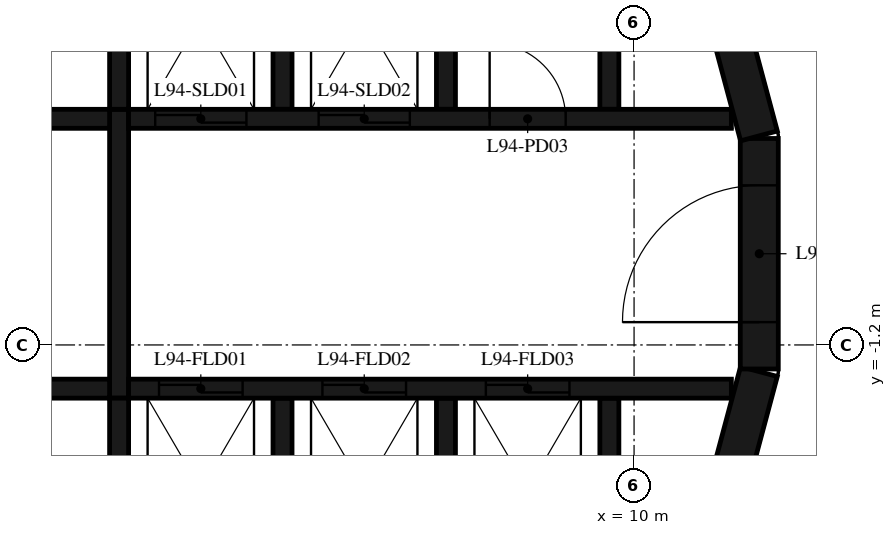
"""IFC4 building model, lengths in metres.
Left out: names, types, materials, properties, quantities, classifications, styles, units other than length and angle.
Written with IfcOpenShell. Run it as: python <this file> out.ifc"""

import sys

from ifc_helpers import new_model, si_unit, direction, frame, frame_2d, origin, place, context, subcontext, project, spatial, polyline, rectangle, outline, extrude, element, fill, save


model = new_model("IFC4")
c1 = context("Model", 3, precision=1e-05, world=origin(), true_north=direction((0.0, 1.0)))
c2 = subcontext(c1, "Body", "Model", "MODEL_VIEW")
j1 = project(units=[si_unit("LENGTHUNIT", "METRE"), si_unit("PLANEANGLEUNIT", "RADIAN")], contexts=[c1])
p1 = place(None, origin())
s1 = spatial("IfcSite", under=j1, at=p1, CompositionType="ELEMENT")
p2 = place(p1, origin())
s2 = spatial("IfcBuilding", under=s1, at=p2, CompositionType="ELEMENT")
p3 = place(p2, frame((0.0, 0.0, 366.2)))
s3 = spatial("IfcBuildingStorey", under=s2, at=p3, CompositionType="ELEMENT", Elevation=366.2)
p4 = place(p3, frame((10.858, -4.479, 0.0), z_axis=(0.0, 0.0, 1.0), x_axis=(0.258734743916, 0.965948410781, 0.0)))
e1 = element("IfcWall", 1, at=p4, inside=s3, PredefinedType="SHEAR", context=c2, shape_type="SweptSolid", body=[
    extrude(rectangle(XDim=3.033, YDim=0.5, at=frame_2d((1.516, 0.0))), origin(), (0.0, 0.0, 1.0), 4.8),
])
p5 = place(p3, frame((11.647, -1.516, 0.0), z_axis=(0.0, 0.0, 1.0), x_axis=(0.0, 1.0, 0.0)))
e2 = element("IfcWall", 2, at=p5, inside=s3, PredefinedType="SHEAR", context=c2, shape_type="SweptSolid", body=[
    extrude(rectangle(XDim=3.033, YDim=0.5, at=frame_2d((1.516, 0.0))), origin(), (0.0, 0.0, 1.0), 4.8),
])
p6 = place(p5, frame((0.616, 0.0, 0.0)))
e3 = element("IfcOpeningElement", 3, at=p6, cuts=e2, PredefinedType="OPENING", context=c2, shape_type="SweptSolid", body=[
    extrude(rectangle(XDim=1.8, YDim=2.1, at=frame_2d((0.9, 1.05))), frame((0.0, 0.26, 0.0), z_axis=(0.0, -1.0, 0.0), x_axis=(1.0, 0.0, 0.0)), (0.0, 0.0, 1.0), 0.52),
])
p7 = place(p3, frame((11.643, 1.55, 0.0), z_axis=(0.0, 0.0, 1.0), x_axis=(-0.258734743916, 0.965948410781, 0.0)))
e4 = element("IfcWall", 4, at=p7, inside=s3, PredefinedType="SHEAR", context=c2, shape_type="SweptSolid", body=[
    extrude(rectangle(XDim=3.033, YDim=0.5, at=frame_2d((1.516, 0.0))), origin(), (0.0, 0.0, 1.0), 4.8),
])
p8 = place(p3, origin())
e5 = element("IfcWall", 5, at=p8, inside=s3, PredefinedType="SHEAR", context=c2, shape_type="SweptSolid", body=[
    extrude(outline(polyline([(-9.8, 1.9), (-9.55, 1.9), (-9.55, 4.8), (-5.5, 4.8), (-5.5, 1.9), (-5.25, 1.9), (-5.25, 4.8), (3.1, 4.8), (3.1, 1.9), (3.35, 1.9), (3.35, 4.8), (5.25, 4.8), (5.25, 1.9), (5.5, 1.9), (5.5, 4.8), (7.4, 4.8), (7.4, 1.9), (7.65, 1.9), (7.65, 4.8), (9.55, 4.8), (9.55, 1.9), (9.8, 1.9), (9.8, 4.8), (9.8, 5.05), (-9.8, 5.05), (-9.8, 4.8), (-9.8, 1.9)])), origin(), (0.0, 0.0, 1.0), 4.8),
])
p9 = place(p3, origin())
e6 = element("IfcWall", 6, at=p9, inside=s3, PredefinedType="SHEAR", context=c2, shape_type="SweptSolid", body=[
    extrude(outline(polyline([(9.8, -4.8), (9.8, -1.9), (9.55, -1.9), (9.55, -4.8), (7.65, -4.8), (7.65, -1.9), (7.4, -1.9), (7.4, -4.8), (5.5, -4.8), (5.5, -1.9), (5.25, -1.9), (5.25, -4.8), (3.35, -4.8), (3.35, -1.9), (3.1, -1.9), (3.1, -4.8), (-9.55, -4.8), (-9.55, -1.9), (-9.8, -1.9), (-9.8, -4.8), (-9.8, -5.05), (9.8, -5.05), (9.8, -4.8)])), origin(), (0.0, 0.0, 1.0), 4.8),
])
p10 = place(p3, frame((-11.28, 1.775, 0.0), z_axis=(0.0, 0.0, 1.0), x_axis=(1.0, 0.0, 0.0)))
e7 = element("IfcWall", 7, at=p10, inside=s3, PredefinedType="SHEAR", context=c2, shape_type="SweptSolid", body=[
    extrude(rectangle(XDim=14.38, YDim=0.25, at=frame_2d((7.19, 0.0))), origin(), (0.0, 0.0, 1.0), 4.8),
])
p11 = place(p10, frame((3.255, 0.0, 0.0)))
e8 = element("IfcOpeningElement", 8, at=p11, cuts=e7, PredefinedType="OPENING", context=c2, shape_type="SweptSolid", body=[
    extrude(rectangle(XDim=1.0, YDim=2.4, at=frame_2d((0.5, 1.2))), frame((0.0, 0.135, 0.0), z_axis=(0.0, -1.0, 0.0), x_axis=(1.0, 0.0, 0.0)), (0.0, 0.0, 1.0), 0.27),
])
p12 = place(p10, frame((9.705, 0.0, 0.0)))
e9 = element("IfcOpeningElement", 9, at=p12, cuts=e7, PredefinedType="OPENING", context=c2, shape_type="SweptSolid", body=[
    extrude(rectangle(XDim=1.0, YDim=2.4, at=frame_2d((0.5, 1.2))), frame((0.0, 0.135, 0.0), z_axis=(0.0, -1.0, 0.0), x_axis=(1.0, 0.0, 0.0)), (0.0, 0.0, 1.0), 0.27),
])
p13 = place(p3, frame((3.35, 1.775, 0.0), z_axis=(0.0, 0.0, 1.0), x_axis=(1.0, 0.0, 0.0)))
e10 = element("IfcWall", 10, at=p13, inside=s3, PredefinedType="SHEAR", context=c2, shape_type="SweptSolid", body=[
    extrude(rectangle(XDim=7.93, YDim=0.25, at=frame_2d((3.965, 0.0))), origin(), (0.0, 0.0, 1.0), 4.8),
])
p14 = place(p13, frame((0.35, 0.0, 0.0)))
e11 = element("IfcOpeningElement", 11, at=p14, cuts=e10, PredefinedType="OPENING", context=c2, shape_type="SweptSolid", body=[
    extrude(rectangle(XDim=1.2, YDim=2.4, at=frame_2d((0.6, 1.2))), frame((0.0, 0.135, 0.0), z_axis=(0.0, -1.0, 0.0), x_axis=(1.0, 0.0, 0.0)), (0.0, 0.0, 1.0), 0.27),
])
p15 = place(p13, frame((2.5, 0.0, 0.0)))
e12 = element("IfcOpeningElement", 12, at=p15, cuts=e10, PredefinedType="OPENING", context=c2, shape_type="SweptSolid", body=[
    extrude(rectangle(XDim=1.2, YDim=2.4, at=frame_2d((0.6, 1.2))), frame((0.0, 0.135, 0.0), z_axis=(0.0, -1.0, 0.0), x_axis=(1.0, 0.0, 0.0)), (0.0, 0.0, 1.0), 0.27),
])
p16 = place(p13, frame((4.75, 0.0, 0.0)))
e13 = element("IfcOpeningElement", 13, at=p16, cuts=e10, PredefinedType="OPENING", context=c2, shape_type="SweptSolid", body=[
    extrude(rectangle(XDim=1.0, YDim=2.4, at=frame_2d((0.5, 1.2))), frame((0.0, 0.135, 0.0), z_axis=(0.0, -1.0, 0.0), x_axis=(1.0, 0.0, 0.0)), (0.0, 0.0, 1.0), 0.27),
])
p17 = place(p3, frame((-11.28, -1.775, 0.0), z_axis=(0.0, 0.0, 1.0), x_axis=(1.0, 0.0, 0.0)))
e14 = element("IfcWall", 14, at=p17, inside=s3, PredefinedType="SHEAR", context=c2, shape_type="SweptSolid", body=[
    extrude(rectangle(XDim=14.38, YDim=0.25, at=frame_2d((7.19, 0.0))), origin(), (0.0, 0.0, 1.0), 4.8),
])
p18 = place(p17, frame((7.555, 0.0, 0.0)))
e15 = element("IfcOpeningElement", 15, at=p18, cuts=e14, PredefinedType="OPENING", context=c2, shape_type="SweptSolid", body=[
    extrude(rectangle(XDim=1.0, YDim=2.4, at=frame_2d((0.5, 1.2))), frame((0.0, 0.135, 0.0), z_axis=(0.0, -1.0, 0.0), x_axis=(1.0, 0.0, 0.0)), (0.0, 0.0, 1.0), 0.27),
])
p19 = place(p3, frame((3.35, -1.775, 0.0), z_axis=(0.0, 0.0, 1.0), x_axis=(1.0, 0.0, 0.0)))
e16 = element("IfcWall", 16, at=p19, inside=s3, PredefinedType="SHEAR", context=c2, shape_type="SweptSolid", body=[
    extrude(rectangle(XDim=7.93, YDim=0.25, at=frame_2d((3.965, 0.0))), origin(), (0.0, 0.0, 1.0), 4.8),
])
p20 = place(p19, frame((0.4, 0.0, 0.0)))
e17 = element("IfcOpeningElement", 17, at=p20, cuts=e16, PredefinedType="OPENING", context=c2, shape_type="SweptSolid", body=[
    extrude(rectangle(XDim=1.1, YDim=2.4, at=frame_2d((0.55, 1.2))), frame((0.0, 0.135, 0.0), z_axis=(0.0, -1.0, 0.0), x_axis=(1.0, 0.0, 0.0)), (0.0, 0.0, 1.0), 0.27),
])
p21 = place(p19, frame((2.55, 0.0, 0.0)))
e18 = element("IfcOpeningElement", 18, at=p21, cuts=e16, PredefinedType="OPENING", context=c2, shape_type="SweptSolid", body=[
    extrude(rectangle(XDim=1.1, YDim=2.4, at=frame_2d((0.55, 1.2))), frame((0.0, 0.135, 0.0), z_axis=(0.0, -1.0, 0.0), x_axis=(1.0, 0.0, 0.0)), (0.0, 0.0, 1.0), 0.27),
])
p22 = place(p19, frame((4.7, 0.0, 0.0)))
e19 = element("IfcOpeningElement", 19, at=p22, cuts=e16, PredefinedType="OPENING", context=c2, shape_type="SweptSolid", body=[
    extrude(rectangle(XDim=1.1, YDim=2.4, at=frame_2d((0.55, 1.2))), frame((0.0, 0.135, 0.0), z_axis=(0.0, -1.0, 0.0), x_axis=(1.0, 0.0, 0.0)), (0.0, 0.0, 1.0), 0.27),
])
p23 = place(p3, frame((3.225, -1.9, 0.0), z_axis=(0.0, 0.0, 1.0), x_axis=(0.0, 1.0, 0.0)))
e20 = element("IfcWall", 20, at=p23, inside=s3, PredefinedType="SHEAR", context=c2, shape_type="SweptSolid", body=[
    extrude(rectangle(XDim=3.8, YDim=0.25, at=frame_2d((1.9, 0.0))), origin(), (0.0, 0.0, 1.0), 4.8),
])
p24 = place(p6, origin())
e21 = element("IfcDoor", 21, at=p24, inside=s3, OperationType="DOUBLE_DOOR_SINGLE_SWING", PredefinedType="DOOR", context=c2, shape_type="SweptSolid", body=[
    extrude(rectangle(XDim=1.8, YDim=2.1, at=frame_2d((0.9, 1.05))), frame((0.0, 0.025, 0.0), z_axis=(0.0, -1.0, 0.0), x_axis=(1.0, 0.0, 0.0)), (0.0, 0.0, 1.0), 0.05),
])
fill(e3, e21)
p25 = place(p14, origin())
e22 = element("IfcDoor", 22, at=p25, inside=s3, OperationType="DOUBLE_DOOR_SLIDING", PredefinedType="DOOR", context=c2, shape_type="SweptSolid", body=[
    extrude(rectangle(XDim=1.2, YDim=2.4, at=frame_2d((0.6, 1.2))), frame((0.0, 0.025, 0.0), z_axis=(0.0, -1.0, 0.0), x_axis=(1.0, 0.0, 0.0)), (0.0, 0.0, 1.0), 0.05),
])
fill(e11, e22)
p26 = place(p15, origin())
e23 = element("IfcDoor", 23, at=p26, inside=s3, OperationType="DOUBLE_DOOR_SLIDING", PredefinedType="DOOR", context=c2, shape_type="SweptSolid", body=[
    extrude(rectangle(XDim=1.2, YDim=2.4, at=frame_2d((0.6, 1.2))), frame((0.0, 0.025, 0.0), z_axis=(0.0, -1.0, 0.0), x_axis=(1.0, 0.0, 0.0)), (0.0, 0.0, 1.0), 0.05),
])
fill(e12, e23)
p27 = place(p20, origin())
e24 = element("IfcDoor", 24, at=p27, inside=s3, OperationType="DOUBLE_DOOR_SLIDING", PredefinedType="DOOR", context=c2, shape_type="SweptSolid", body=[
    extrude(rectangle(XDim=1.1, YDim=2.4, at=frame_2d((0.55, 1.2))), frame((0.0, 0.025, 0.0), z_axis=(0.0, -1.0, 0.0), x_axis=(1.0, 0.0, 0.0)), (0.0, 0.0, 1.0), 0.05),
])
fill(e17, e24)
p28 = place(p21, origin())
e25 = element("IfcDoor", 25, at=p28, inside=s3, OperationType="DOUBLE_DOOR_SLIDING", PredefinedType="DOOR", context=c2, shape_type="SweptSolid", body=[
    extrude(rectangle(XDim=1.1, YDim=2.4, at=frame_2d((0.55, 1.2))), frame((0.0, 0.025, 0.0), z_axis=(0.0, -1.0, 0.0), x_axis=(1.0, 0.0, 0.0)), (0.0, 0.0, 1.0), 0.05),
])
fill(e18, e25)
p29 = place(p22, origin())
e26 = element("IfcDoor", 26, at=p29, inside=s3, OperationType="DOUBLE_DOOR_SLIDING", PredefinedType="DOOR", context=c2, shape_type="SweptSolid", body=[
    extrude(rectangle(XDim=1.1, YDim=2.4, at=frame_2d((0.55, 1.2))), frame((0.0, 0.025, 0.0), z_axis=(0.0, -1.0, 0.0), x_axis=(1.0, 0.0, 0.0)), (0.0, 0.0, 1.0), 0.05),
])
fill(e19, e26)
p30 = place(p16, origin())
e27 = element("IfcDoor", 27, at=p30, inside=s3, OperationType="SINGLE_SWING_RIGHT", PredefinedType="DOOR", context=c2, shape_type="SweptSolid", body=[
    extrude(rectangle(XDim=1.0, YDim=2.4, at=frame_2d((0.5, 1.2))), frame((0.0, 0.025, 0.0), z_axis=(0.0, -1.0, 0.0), x_axis=(1.0, 0.0, 0.0)), (0.0, 0.0, 1.0), 0.05),
])
fill(e13, e27)
save(model, sys.argv[1])
